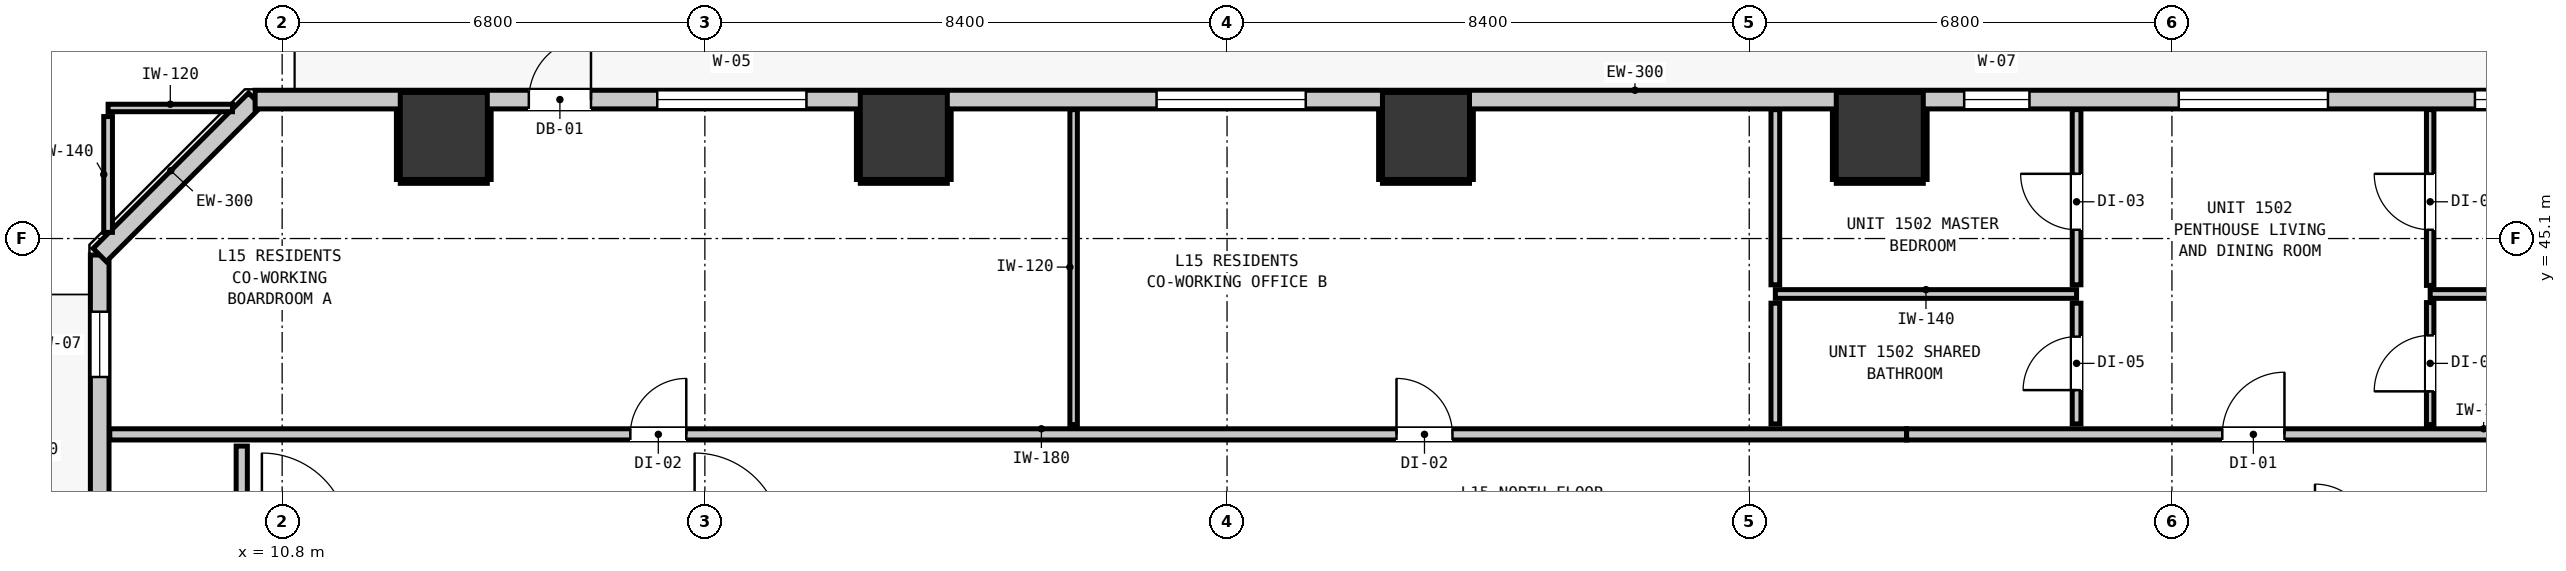
"""IFC4 building model, lengths in metres.
Left out: names, types, materials, properties, quantities, classifications, styles, units other than length and angle.
Written with IfcOpenShell. Run it as: python <this file> out.ifc"""

import sys

from ifc_helpers import new_model, si_unit, direction, frame, frame_2d, origin, origin_2d, place, context, subcontext, project, spatial, rectangle, extrude, element, fill, save


model = new_model("IFC4")
c1 = context("Model", 3, precision=1e-05, world=origin(), true_north=direction((0.0, 1.0)))
c2 = subcontext(c1, "Body", "Model", "MODEL_VIEW")
j1 = project(units=[si_unit("LENGTHUNIT", "METRE"), si_unit("PLANEANGLEUNIT", "RADIAN")], contexts=[c1])
p1 = place(None, origin())
s1 = spatial("IfcSite", under=j1, at=p1, CompositionType="ELEMENT")
p2 = place(p1, origin())
s2 = spatial("IfcBuilding", under=s1, at=p2, CompositionType="ELEMENT")
p3 = place(p2, frame((0.0, 0.0, 55.2)))
s3 = spatial("IfcBuildingStorey", under=s2, at=p3, CompositionType="ELEMENT", Elevation=55.2)
for number, where, z_axis, x_axis in (
    (1, (13.4, 46.75, 0.0), (0.0, 0.0, 1.0), (1.0, 0.0, 0.0)),
    (2, (20.8, 46.75, 0.0), (0.0, 0.0, 1.0), (1.0, 0.0, 0.0)),
    (3, (29.2, 46.75, 0.0), (0.0, 0.0, 1.0), (1.0, 0.0, 0.0)),
    (4, (36.5, 46.75, 0.0), (0.0, 0.0, 1.0), (1.0, 0.0, 0.0)),
):
    element("IfcColumn", number, at=place(p3, frame(where, z_axis=z_axis, x_axis=x_axis)), inside=s3, PredefinedType="COLUMN", context=c2, shape_type="SweptSolid", body=[
        extrude(rectangle(XDim=1.4, YDim=1.4, at=origin_2d()), origin(), (0.0, 0.0, 1.0), 3.32),
    ])
p4 = place(p3, frame((7.865, 10.165, 0.0), z_axis=(0.0, 0.0, 1.0), x_axis=(0.0, 1.0, 0.0)))
e5 = element("IfcWall", 5, at=p4, inside=s3, PredefinedType="STANDARD", context=c2, shape_type="SweptSolid", body=[
    extrude(rectangle(XDim=34.67, YDim=0.3, at=frame_2d((17.335, 0.0))), origin(), (0.0, 0.0, 1.0), 3.06),
])
p5 = place(p4, frame((0.901, 0.0, 0.0)))
e6 = element("IfcOpeningElement", 6, at=p5, cuts=e5, PredefinedType="OPENING", context=c2, shape_type="SweptSolid", body=[
    extrude(rectangle(XDim=1.0, YDim=2.15, at=frame_2d((0.5, 1.075))), frame((0.0, 0.16, 0.0), z_axis=(0.0, -1.0, 0.0), x_axis=(1.0, 0.0, 0.0)), (0.0, 0.0, 1.0), 0.32),
])
p6 = place(p4, frame((32.708, 0.0, 0.85)))
e7 = element("IfcOpeningElement", 7, at=p6, cuts=e5, PredefinedType="OPENING", context=c2, shape_type="SweptSolid", body=[
    extrude(rectangle(XDim=1.05, YDim=1.65, at=frame_2d((0.525, 0.825))), frame((0.0, 0.16, 0.0), z_axis=(0.0, -1.0, 0.0), x_axis=(1.0, 0.0, 0.0)), (0.0, 0.0, 1.0), 0.32),
])
p7 = place(p3, frame((7.865, 44.835, 0.0), z_axis=(0.0, 0.0, 1.0), x_axis=(0.707106781187, 0.707106781187, 0.0)))
e8 = element("IfcWall", 8, at=p7, inside=s3, PredefinedType="STANDARD", context=c2, shape_type="SweptSolid", body=[
    extrude(rectangle(XDim=3.536, YDim=0.3, at=frame_2d((1.768, 0.0))), origin(), (0.0, 0.0, 1.0), 3.06),
])
p8 = place(p3, frame((10.365, 47.335, 0.0), z_axis=(0.0, 0.0, 1.0), x_axis=(1.0, 0.0, 0.0)))
e9 = element("IfcWall", 9, at=p8, inside=s3, PredefinedType="STANDARD", context=c2, shape_type="SweptSolid", body=[
    extrude(rectangle(XDim=37.47, YDim=0.3, at=frame_2d((18.735, 0.0))), origin(), (0.0, 0.0, 1.0), 3.06),
])
p9 = place(p8, frame((4.403, 0.0, 0.0)))
e10 = element("IfcOpeningElement", 10, at=p9, cuts=e9, PredefinedType="OPENING", context=c2, shape_type="SweptSolid", body=[
    extrude(rectangle(XDim=1.0, YDim=2.15, at=frame_2d((0.5, 1.075))), frame((0.0, 0.16, 0.0), z_axis=(0.0, -1.0, 0.0), x_axis=(1.0, 0.0, 0.0)), (0.0, 0.0, 1.0), 0.32),
])
p10 = place(p8, frame((6.469, 0.0, 0.85)))
e11 = element("IfcOpeningElement", 11, at=p10, cuts=e9, PredefinedType="OPENING", context=c2, shape_type="SweptSolid", body=[
    extrude(rectangle(XDim=2.4, YDim=1.95, at=frame_2d((1.2, 0.975))), frame((0.0, 0.16, 0.0), z_axis=(0.0, -1.0, 0.0), x_axis=(1.0, 0.0, 0.0)), (0.0, 0.0, 1.0), 0.32),
])
p11 = place(p8, frame((14.501, 0.0, 0.85)))
e12 = element("IfcOpeningElement", 12, at=p11, cuts=e9, PredefinedType="OPENING", context=c2, shape_type="SweptSolid", body=[
    extrude(rectangle(XDim=2.4, YDim=1.95, at=frame_2d((1.2, 0.975))), frame((0.0, 0.16, 0.0), z_axis=(0.0, -1.0, 0.0), x_axis=(1.0, 0.0, 0.0)), (0.0, 0.0, 1.0), 0.32),
])
p12 = place(p8, frame((30.945, 0.0, 0.85)))
e13 = element("IfcOpeningElement", 13, at=p12, cuts=e9, PredefinedType="OPENING", context=c2, shape_type="SweptSolid", body=[
    extrude(rectangle(XDim=2.4, YDim=1.95, at=frame_2d((1.2, 0.975))), frame((0.0, 0.16, 0.0), z_axis=(0.0, -1.0, 0.0), x_axis=(1.0, 0.0, 0.0)), (0.0, 0.0, 1.0), 0.32),
])
p13 = place(p8, frame((27.493, 0.0, 0.85)))
e14 = element("IfcOpeningElement", 14, at=p13, cuts=e9, PredefinedType="OPENING", context=c2, shape_type="SweptSolid", body=[
    extrude(rectangle(XDim=1.05, YDim=1.65, at=frame_2d((0.525, 0.825))), frame((0.0, 0.16, 0.0), z_axis=(0.0, -1.0, 0.0), x_axis=(1.0, 0.0, 0.0)), (0.0, 0.0, 1.0), 0.32),
])
p14 = place(p8, frame((35.709, 0.0, 0.85)))
e15 = element("IfcOpeningElement", 15, at=p14, cuts=e9, PredefinedType="OPENING", context=c2, shape_type="SweptSolid", body=[
    extrude(rectangle(XDim=1.05, YDim=1.65, at=frame_2d((0.525, 0.825))), frame((0.0, 0.16, 0.0), z_axis=(0.0, -1.0, 0.0), x_axis=(1.0, 0.0, 0.0)), (0.0, 0.0, 1.0), 0.32),
])
p15 = place(p3, frame((8.027, 41.95, 0.0), z_axis=(0.0, 0.0, 1.0), x_axis=(1.0, 0.0, 0.0)))
e16 = element("IfcWall", 16, at=p15, inside=s3, PredefinedType="PARTITIONING", context=c2, shape_type="SweptSolid", body=[
    extrude(rectangle(XDim=28.905, YDim=0.18, at=frame_2d((14.452, 0.0))), origin(), (0.0, 0.0, 1.0), 3.06),
])
p16 = place(p15, frame((8.374, 0.0, 0.0)))
e17 = element("IfcOpeningElement", 17, at=p16, cuts=e16, PredefinedType="OPENING", context=c2, shape_type="SweptSolid", body=[
    extrude(rectangle(XDim=0.9, YDim=2.1, at=frame_2d((0.45, 1.05))), frame((0.0, 0.1, 0.0), z_axis=(0.0, -1.0, 0.0), x_axis=(1.0, 0.0, 0.0)), (0.0, 0.0, 1.0), 0.2),
])
p17 = place(p15, frame((20.699, 0.0, 0.0)))
e18 = element("IfcOpeningElement", 18, at=p17, cuts=e16, PredefinedType="OPENING", context=c2, shape_type="SweptSolid", body=[
    extrude(rectangle(XDim=0.9, YDim=2.1, at=frame_2d((0.45, 1.05))), frame((0.0, 0.1, 0.0), z_axis=(0.0, -1.0, 0.0), x_axis=(1.0, 0.0, 0.0)), (0.0, 0.0, 1.0), 0.2),
])
p18 = place(p3, frame((36.932, 41.95, 0.0), z_axis=(0.0, 0.0, 1.0), x_axis=(1.0, 0.0, 0.0)))
e19 = element("IfcWall", 19, at=p18, inside=s3, PredefinedType="PARTITIONING", context=c2, shape_type="SweptSolid", body=[
    extrude(rectangle(XDim=12.386, YDim=0.18, at=frame_2d((6.193, 0.0))), origin(), (0.0, 0.0, 1.0), 2.445),
])
p19 = place(p18, frame((5.078, 0.0, 0.0)))
e20 = element("IfcOpeningElement", 20, at=p19, cuts=e19, PredefinedType="OPENING", context=c2, shape_type="SweptSolid", body=[
    extrude(rectangle(XDim=1.0, YDim=2.15, at=frame_2d((0.5, 1.075))), frame((0.0, 0.1, 0.0), z_axis=(0.0, -1.0, 0.0), x_axis=(1.0, 0.0, 0.0)), (0.0, 0.0, 1.0), 0.2),
])
p20 = place(p3, frame((34.82, 44.208, 0.0), z_axis=(0.0, 0.0, 1.0), x_axis=(1.0, 0.0, 0.0)))
e21 = element("IfcWall", 21, at=p20, inside=s3, PredefinedType="PARTITIONING", context=c2, shape_type="SweptSolid", body=[
    extrude(rectangle(XDim=4.846, YDim=0.14, at=frame_2d((2.423, 0.0))), origin(), (0.0, 0.0, 1.0), 3.06),
])
p21 = place(p3, frame((45.354, 44.208, 0.0), z_axis=(0.0, 0.0, 1.0), x_axis=(1.0, 0.0, 0.0)))
e22 = element("IfcWall", 22, at=p21, inside=s3, PredefinedType="PARTITIONING", context=c2, shape_type="SweptSolid", body=[
    extrude(rectangle(XDim=4.819, YDim=0.14, at=frame_2d((2.41, 0.0))), origin(), (0.0, 0.0, 1.0), 3.06),
])
p22 = place(p3, frame((8.0, 47.2, 0.0), z_axis=(0.0, 0.0, 1.0), x_axis=(1.0, 0.0, 0.0)))
e23 = element("IfcWall", 23, at=p22, inside=s3, PredefinedType="PARTITIONING", context=c2, shape_type="SweptSolid", body=[
    extrude(rectangle(XDim=2.001, YDim=0.12, at=frame_2d((1.0, 0.0))), origin(), (0.0, 0.0, 1.0), 3.06),
])
p23 = place(p3, frame((10.15, 40.438, 0.0), z_axis=(0.0, 0.0, 1.0), x_axis=(0.0, 1.0, 0.0)))
e24 = element("IfcWall", 24, at=p23, inside=s3, PredefinedType="PARTITIONING", context=c2, shape_type="SweptSolid", body=[
    extrude(rectangle(XDim=1.324, YDim=0.18, at=frame_2d((0.662, 0.0))), origin(), (0.0, 0.0, 1.0), 2.445),
])
p24 = place(p3, frame((8.0, 45.199, 0.0), z_axis=(0.0, 0.0, 1.0), x_axis=(0.0, 1.0, 0.0)))
e25 = element("IfcWall", 25, at=p24, inside=s3, PredefinedType="PARTITIONING", context=c2, shape_type="SweptSolid", body=[
    extrude(rectangle(XDim=1.863, YDim=0.14, at=frame_2d((0.932, 0.0))), origin(), (0.0, 0.0, 1.0), 3.06),
])
p25 = place(p3, frame((34.82, 42.118, 0.0), z_axis=(0.0, 0.0, 1.0), x_axis=(0.0, 1.0, 0.0)))
e26 = element("IfcWall", 26, at=p25, inside=s3, PredefinedType="PARTITIONING", context=c2, shape_type="SweptSolid", body=[
    extrude(rectangle(XDim=1.942, YDim=0.14, at=frame_2d((0.971, 0.0))), origin(), (0.0, 0.0, 1.0), 3.06),
])
p26 = place(p3, frame((34.82, 44.356, 0.0), z_axis=(0.0, 0.0, 1.0), x_axis=(0.0, 1.0, 0.0)))
e27 = element("IfcWall", 27, at=p26, inside=s3, PredefinedType="PARTITIONING", context=c2, shape_type="SweptSolid", body=[
    extrude(rectangle(XDim=2.817, YDim=0.14, at=frame_2d((1.409, 0.0))), origin(), (0.0, 0.0, 1.0), 3.06),
])
p27 = place(p3, frame((39.666, 42.118, 0.0), z_axis=(0.0, 0.0, 1.0), x_axis=(0.0, 1.0, 0.0)))
e28 = element("IfcWall", 28, at=p27, inside=s3, PredefinedType="PARTITIONING", context=c2, shape_type="SweptSolid", body=[
    extrude(rectangle(XDim=1.942, YDim=0.14, at=frame_2d((0.971, 0.0))), origin(), (0.0, 0.0, 1.0), 3.06),
])
p28 = place(p27, frame((0.544, 0.0, 0.0)))
e29 = element("IfcOpeningElement", 29, at=p28, cuts=e28, PredefinedType="OPENING", context=c2, shape_type="SweptSolid", body=[
    extrude(rectangle(XDim=0.86, YDim=2.02, at=frame_2d((0.43, 1.01))), frame((0.0, 0.08, 0.0), z_axis=(0.0, -1.0, 0.0), x_axis=(1.0, 0.0, 0.0)), (0.0, 0.0, 1.0), 0.16),
])
p29 = place(p3, frame((39.666, 44.356, 0.0), z_axis=(0.0, 0.0, 1.0), x_axis=(0.0, 1.0, 0.0)))
e30 = element("IfcWall", 30, at=p29, inside=s3, PredefinedType="PARTITIONING", context=c2, shape_type="SweptSolid", body=[
    extrude(rectangle(XDim=2.817, YDim=0.14, at=frame_2d((1.409, 0.0))), origin(), (0.0, 0.0, 1.0), 3.06),
])
p30 = place(p29, frame((0.885, 0.0, 0.0)))
e31 = element("IfcOpeningElement", 31, at=p30, cuts=e30, PredefinedType="OPENING", context=c2, shape_type="SweptSolid", body=[
    extrude(rectangle(XDim=0.9, YDim=2.1, at=frame_2d((0.45, 1.05))), frame((0.0, 0.08, 0.0), z_axis=(0.0, -1.0, 0.0), x_axis=(1.0, 0.0, 0.0)), (0.0, 0.0, 1.0), 0.16),
])
p31 = place(p3, frame((23.532, 42.108, 0.0), z_axis=(0.0, 0.0, 1.0), x_axis=(0.0, 1.0, 0.0)))
e32 = element("IfcWall", 32, at=p31, inside=s3, PredefinedType="PARTITIONING", context=c2, shape_type="SweptSolid", body=[
    extrude(rectangle(XDim=5.065, YDim=0.12, at=frame_2d((2.533, 0.0))), origin(), (0.0, 0.0, 1.0), 3.06),
])
p32 = place(p3, frame((45.354, 42.108, 0.0), z_axis=(0.0, 0.0, 1.0), x_axis=(0.0, 1.0, 0.0)))
e33 = element("IfcWall", 33, at=p32, inside=s3, PredefinedType="PARTITIONING", context=c2, shape_type="SweptSolid", body=[
    extrude(rectangle(XDim=1.962, YDim=0.12, at=frame_2d((0.981, 0.0))), origin(), (0.0, 0.0, 1.0), 3.06),
])
p33 = place(p32, frame((0.534, 0.0, 0.0)))
e34 = element("IfcOpeningElement", 34, at=p33, cuts=e33, PredefinedType="OPENING", context=c2, shape_type="SweptSolid", body=[
    extrude(rectangle(XDim=0.9, YDim=2.1, at=frame_2d((0.45, 1.05))), frame((0.0, 0.07, 0.0), z_axis=(0.0, -1.0, 0.0), x_axis=(1.0, 0.0, 0.0)), (0.0, 0.0, 1.0), 0.14),
])
p34 = place(p3, frame((45.354, 44.346, 0.0), z_axis=(0.0, 0.0, 1.0), x_axis=(0.0, 1.0, 0.0)))
e35 = element("IfcWall", 35, at=p34, inside=s3, PredefinedType="PARTITIONING", context=c2, shape_type="SweptSolid", body=[
    extrude(rectangle(XDim=2.827, YDim=0.12, at=frame_2d((1.414, 0.0))), origin(), (0.0, 0.0, 1.0), 3.06),
])
p35 = place(p34, frame((0.895, 0.0, 0.0)))
e36 = element("IfcOpeningElement", 36, at=p35, cuts=e35, PredefinedType="OPENING", context=c2, shape_type="SweptSolid", body=[
    extrude(rectangle(XDim=0.9, YDim=2.1, at=frame_2d((0.45, 1.05))), frame((0.0, 0.07, 0.0), z_axis=(0.0, -1.0, 0.0), x_axis=(1.0, 0.0, 0.0)), (0.0, 0.0, 1.0), 0.14),
])
p36 = place(p3, frame((12.7, 46.018, 0.0), z_axis=(0.0, 0.0, 1.0), x_axis=(1.0, 0.0, 0.0)))
e37 = element("IfcWall", 37, at=p36, inside=s3, PredefinedType="PARTITIONING", context=c2, shape_type="SweptSolid", body=[
    extrude(rectangle(XDim=1.4, YDim=0.06, at=frame_2d((0.7, 0.0))), origin(), (0.0, 0.0, 1.0), 1.45),
])
for number, where, z_axis, x_axis in (
    (38, (12.668, 46.05, 0.0), (0.0, 0.0, 1.0), (0.0, 1.0, 0.0)),
    (39, (14.132, 46.05, 0.0), (0.0, 0.0, 1.0), (0.0, 1.0, 0.0)),
):
    element("IfcWall", number, at=place(p3, frame(where, z_axis=z_axis, x_axis=x_axis)), inside=s3, PredefinedType="PARTITIONING", context=c2, shape_type="SweptSolid", body=[
        extrude(rectangle(XDim=1.12, YDim=0.06, at=frame_2d((0.56, 0.0))), origin(), (0.0, 0.0, 1.0), 1.45),
    ])
p37 = place(p3, frame((20.1, 46.018, 0.0), z_axis=(0.0, 0.0, 1.0), x_axis=(1.0, 0.0, 0.0)))
e40 = element("IfcWall", 40, at=p37, inside=s3, PredefinedType="PARTITIONING", context=c2, shape_type="SweptSolid", body=[
    extrude(rectangle(XDim=1.4, YDim=0.06, at=frame_2d((0.7, 0.0))), origin(), (0.0, 0.0, 1.0), 1.45),
])
for number, where, z_axis, x_axis in (
    (41, (20.068, 46.05, 0.0), (0.0, 0.0, 1.0), (0.0, 1.0, 0.0)),
    (42, (21.532, 46.05, 0.0), (0.0, 0.0, 1.0), (0.0, 1.0, 0.0)),
):
    element("IfcWall", number, at=place(p3, frame(where, z_axis=z_axis, x_axis=x_axis)), inside=s3, PredefinedType="PARTITIONING", context=c2, shape_type="SweptSolid", body=[
        extrude(rectangle(XDim=1.12, YDim=0.06, at=frame_2d((0.56, 0.0))), origin(), (0.0, 0.0, 1.0), 1.45),
    ])
p38 = place(p3, frame((28.5, 46.018, 0.0), z_axis=(0.0, 0.0, 1.0), x_axis=(1.0, 0.0, 0.0)))
e43 = element("IfcWall", 43, at=p38, inside=s3, PredefinedType="PARTITIONING", context=c2, shape_type="SweptSolid", body=[
    extrude(rectangle(XDim=1.4, YDim=0.06, at=frame_2d((0.7, 0.0))), origin(), (0.0, 0.0, 1.0), 1.45),
])
for number, where, z_axis, x_axis in (
    (44, (28.468, 46.05, 0.0), (0.0, 0.0, 1.0), (0.0, 1.0, 0.0)),
    (45, (29.932, 46.05, 0.0), (0.0, 0.0, 1.0), (0.0, 1.0, 0.0)),
):
    element("IfcWall", number, at=place(p3, frame(where, z_axis=z_axis, x_axis=x_axis)), inside=s3, PredefinedType="PARTITIONING", context=c2, shape_type="SweptSolid", body=[
        extrude(rectangle(XDim=1.12, YDim=0.06, at=frame_2d((0.56, 0.0))), origin(), (0.0, 0.0, 1.0), 1.45),
    ])
p39 = place(p3, frame((35.8, 46.018, 0.0), z_axis=(0.0, 0.0, 1.0), x_axis=(1.0, 0.0, 0.0)))
e46 = element("IfcWall", 46, at=p39, inside=s3, PredefinedType="PARTITIONING", context=c2, shape_type="SweptSolid", body=[
    extrude(rectangle(XDim=1.4, YDim=0.06, at=frame_2d((0.7, 0.0))), origin(), (0.0, 0.0, 1.0), 1.45),
])
for number, where, z_axis, x_axis in (
    (47, (35.768, 46.05, 0.0), (0.0, 0.0, 1.0), (0.0, 1.0, 0.0)),
    (48, (37.232, 46.05, 0.0), (0.0, 0.0, 1.0), (0.0, 1.0, 0.0)),
):
    element("IfcWall", number, at=place(p3, frame(where, z_axis=z_axis, x_axis=x_axis)), inside=s3, PredefinedType="PARTITIONING", context=c2, shape_type="SweptSolid", body=[
        extrude(rectangle(XDim=1.12, YDim=0.06, at=frame_2d((0.56, 0.0))), origin(), (0.0, 0.0, 1.0), 1.45),
    ])
p40 = place(p9, origin())
e49 = element("IfcDoor", 49, at=p40, inside=s3, OperationType="SINGLE_SWING_RIGHT", PredefinedType="DOOR", context=c2, shape_type="SweptSolid", body=[
    extrude(rectangle(XDim=1.0, YDim=2.15, at=frame_2d((0.5, 1.075))), frame((0.0, 0.025, 0.0), z_axis=(0.0, -1.0, 0.0), x_axis=(1.0, 0.0, 0.0)), (0.0, 0.0, 1.0), 0.05),
])
fill(e10, e49)
p41 = place(p6, origin())
e50 = element("IfcWindow", 50, at=p41, inside=s3, PartitioningType="SINGLE_PANEL", PredefinedType="WINDOW", context=c2, shape_type="SweptSolid", body=[
    extrude(rectangle(XDim=1.05, YDim=1.65, at=frame_2d((0.525, 0.825))), frame((0.0, 0.03, 0.0), z_axis=(0.0, -1.0, 0.0), x_axis=(1.0, 0.0, 0.0)), (0.0, 0.0, 1.0), 0.06),
])
fill(e7, e50)
p42 = place(p10, origin())
e51 = element("IfcWindow", 51, at=p42, inside=s3, PartitioningType="SINGLE_PANEL", PredefinedType="WINDOW", context=c2, shape_type="SweptSolid", body=[
    extrude(rectangle(XDim=2.4, YDim=1.95, at=frame_2d((1.2, 0.975))), frame((0.0, 0.03, 0.0), z_axis=(0.0, -1.0, 0.0), x_axis=(1.0, 0.0, 0.0)), (0.0, 0.0, 1.0), 0.06),
])
fill(e11, e51)
p43 = place(p11, origin())
e52 = element("IfcWindow", 52, at=p43, inside=s3, PartitioningType="SINGLE_PANEL", PredefinedType="WINDOW", context=c2, shape_type="SweptSolid", body=[
    extrude(rectangle(XDim=2.4, YDim=1.95, at=frame_2d((1.2, 0.975))), frame((0.0, 0.03, 0.0), z_axis=(0.0, -1.0, 0.0), x_axis=(1.0, 0.0, 0.0)), (0.0, 0.0, 1.0), 0.06),
])
fill(e12, e52)
p44 = place(p12, origin())
e53 = element("IfcWindow", 53, at=p44, inside=s3, PartitioningType="SINGLE_PANEL", PredefinedType="WINDOW", context=c2, shape_type="SweptSolid", body=[
    extrude(rectangle(XDim=2.4, YDim=1.95, at=frame_2d((1.2, 0.975))), frame((0.0, 0.03, 0.0), z_axis=(0.0, -1.0, 0.0), x_axis=(1.0, 0.0, 0.0)), (0.0, 0.0, 1.0), 0.06),
])
fill(e13, e53)
p45 = place(p13, origin())
e54 = element("IfcWindow", 54, at=p45, inside=s3, PartitioningType="SINGLE_PANEL", PredefinedType="WINDOW", context=c2, shape_type="SweptSolid", body=[
    extrude(rectangle(XDim=1.05, YDim=1.65, at=frame_2d((0.525, 0.825))), frame((0.0, 0.03, 0.0), z_axis=(0.0, -1.0, 0.0), x_axis=(1.0, 0.0, 0.0)), (0.0, 0.0, 1.0), 0.06),
])
fill(e14, e54)
p46 = place(p14, origin())
e55 = element("IfcWindow", 55, at=p46, inside=s3, PartitioningType="SINGLE_PANEL", PredefinedType="WINDOW", context=c2, shape_type="SweptSolid", body=[
    extrude(rectangle(XDim=1.05, YDim=1.65, at=frame_2d((0.525, 0.825))), frame((0.0, 0.03, 0.0), z_axis=(0.0, -1.0, 0.0), x_axis=(1.0, 0.0, 0.0)), (0.0, 0.0, 1.0), 0.06),
])
fill(e15, e55)
p47 = place(p16, origin())
e56 = element("IfcDoor", 56, at=p47, inside=s3, OperationType="SINGLE_SWING_RIGHT", PredefinedType="DOOR", context=c2, shape_type="SweptSolid", body=[
    extrude(rectangle(XDim=0.9, YDim=2.1, at=frame_2d((0.45, 1.05))), frame((0.0, 0.025, 0.0), z_axis=(0.0, -1.0, 0.0), x_axis=(1.0, 0.0, 0.0)), (0.0, 0.0, 1.0), 0.05),
])
fill(e17, e56)
p48 = place(p17, origin())
e57 = element("IfcDoor", 57, at=p48, inside=s3, OperationType="SINGLE_SWING_LEFT", PredefinedType="DOOR", context=c2, shape_type="SweptSolid", body=[
    extrude(rectangle(XDim=0.9, YDim=2.1, at=frame_2d((0.45, 1.05))), frame((0.0, 0.025, 0.0), z_axis=(0.0, -1.0, 0.0), x_axis=(1.0, 0.0, 0.0)), (0.0, 0.0, 1.0), 0.05),
])
fill(e18, e57)
p49 = place(p19, origin())
e58 = element("IfcDoor", 58, at=p49, inside=s3, OperationType="SINGLE_SWING_RIGHT", PredefinedType="DOOR", context=c2, shape_type="SweptSolid", body=[
    extrude(rectangle(XDim=1.0, YDim=2.15, at=frame_2d((0.5, 1.075))), frame((0.0, 0.025, 0.0), z_axis=(0.0, -1.0, 0.0), x_axis=(1.0, 0.0, 0.0)), (0.0, 0.0, 1.0), 0.05),
])
fill(e20, e58)
p50 = place(p28, origin())
e59 = element("IfcDoor", 59, at=p50, inside=s3, OperationType="SINGLE_SWING_LEFT", PredefinedType="DOOR", context=c2, shape_type="SweptSolid", body=[
    extrude(rectangle(XDim=0.86, YDim=2.02, at=frame_2d((0.43, 1.01))), frame((0.0, 0.025, 0.0), z_axis=(0.0, -1.0, 0.0), x_axis=(1.0, 0.0, 0.0)), (0.0, 0.0, 1.0), 0.05),
])
fill(e29, e59)
p51 = place(p30, origin())
e60 = element("IfcDoor", 60, at=p51, inside=s3, OperationType="SINGLE_SWING_RIGHT", PredefinedType="DOOR", context=c2, shape_type="SweptSolid", body=[
    extrude(rectangle(XDim=0.9, YDim=2.1, at=frame_2d((0.45, 1.05))), frame((0.0, 0.025, 0.0), z_axis=(0.0, -1.0, 0.0), x_axis=(1.0, 0.0, 0.0)), (0.0, 0.0, 1.0), 0.05),
])
fill(e31, e60)
p52 = place(p33, origin())
e61 = element("IfcDoor", 61, at=p52, inside=s3, OperationType="SINGLE_SWING_LEFT", PredefinedType="DOOR", context=c2, shape_type="SweptSolid", body=[
    extrude(rectangle(XDim=0.9, YDim=2.1, at=frame_2d((0.45, 1.05))), frame((0.0, 0.025, 0.0), z_axis=(0.0, -1.0, 0.0), x_axis=(1.0, 0.0, 0.0)), (0.0, 0.0, 1.0), 0.05),
])
fill(e34, e61)
p53 = place(p35, origin())
e62 = element("IfcDoor", 62, at=p53, inside=s3, OperationType="SINGLE_SWING_RIGHT", PredefinedType="DOOR", context=c2, shape_type="SweptSolid", body=[
    extrude(rectangle(XDim=0.9, YDim=2.1, at=frame_2d((0.45, 1.05))), frame((0.0, 0.025, 0.0), z_axis=(0.0, -1.0, 0.0), x_axis=(1.0, 0.0, 0.0)), (0.0, 0.0, 1.0), 0.05),
])
fill(e36, e62)
save(model, sys.argv[1])
